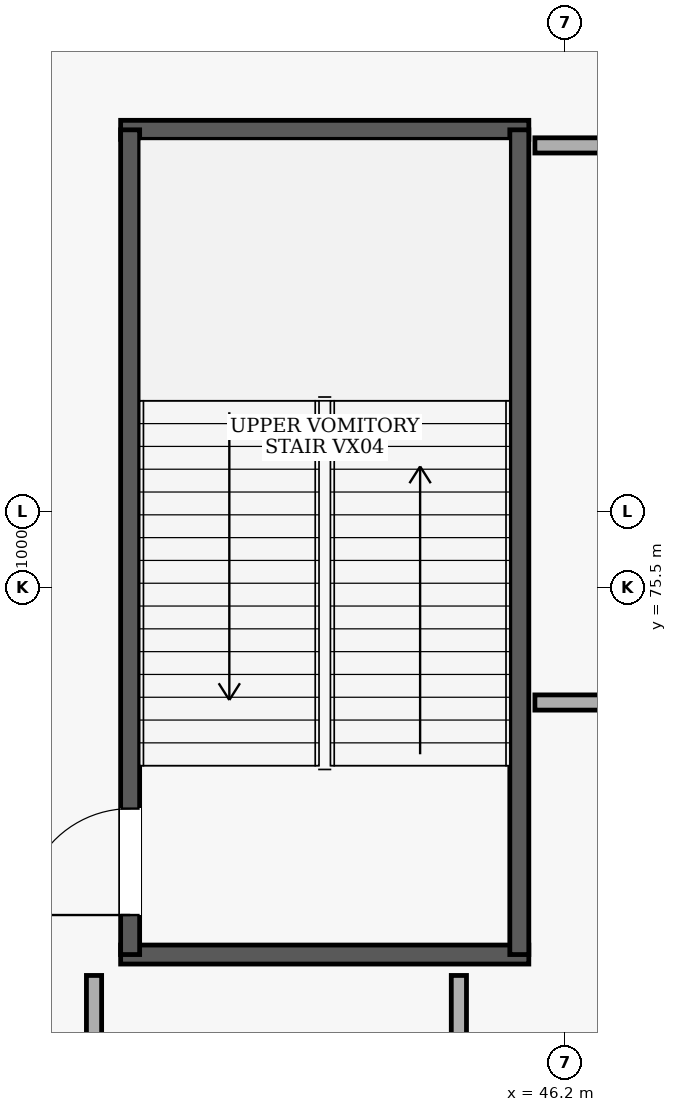
"""IFC4 building model, lengths in metres.
Left out: names, types, materials, properties, quantities, classifications, styles, units other than length and angle.
Written with IfcOpenShell. Run it as: python <this file> out.ifc"""

import sys

from ifc_helpers import new_model, si_unit, direction, frame, frame_2d, origin, place, context, subcontext, project, spatial, rectangle, extrude, element, fill, save


model = new_model("IFC4")
c1 = context("Model", 3, precision=1e-05, world=origin(), true_north=direction((0.0, 1.0)))
c2 = subcontext(c1, "Body", "Model", "MODEL_VIEW")
j1 = project(units=[si_unit("LENGTHUNIT", "METRE"), si_unit("PLANEANGLEUNIT", "RADIAN")], contexts=[c1])
p1 = place(None, origin())
s1 = spatial("IfcSite", under=j1, at=p1, CompositionType="ELEMENT")
p2 = place(p1, origin())
s2 = spatial("IfcBuilding", under=s1, at=p2, CompositionType="ELEMENT")
p3 = place(p2, origin())
s3 = spatial("IfcBuildingStorey", under=s2, at=p3, CompositionType="ELEMENT", Elevation=0.0)
for number, where, z_axis, x_axis in (
    (1, (40.35, 70.675, 0.0), (0.0, 0.0, 1.0), (1.0, 0.0, 0.0)),
    (2, (45.72, 81.525, 0.0), (0.0, 0.0, 1.0), (-1.0, 0.0, 0.0)),
):
    element("IfcWall", number, at=place(p3, frame(where, z_axis=z_axis, x_axis=x_axis)), inside=s3, PredefinedType="SHEAR", context=c2, shape_type="SweptSolid", body=[
        extrude(rectangle(XDim=5.37, YDim=0.25, at=frame_2d((2.685, 0.0))), origin(), (0.0, 0.0, 1.0), 5.08),
    ])
p4 = place(p3, frame((40.475, 70.675, 0.0), z_axis=(0.0, 0.0, 1.0), x_axis=(0.0, 1.0, 0.0)))
e3 = element("IfcWall", 3, at=p4, inside=s3, PredefinedType="SHEAR", context=c2, shape_type="SweptSolid", body=[
    extrude(rectangle(XDim=10.85, YDim=0.25, at=frame_2d((5.425, 0.0))), origin(), (0.0, 0.0, 1.0), 5.08),
])
p5 = place(p4, frame((0.52, 0.0, 0.0)))
e4 = element("IfcOpeningElement", 4, at=p5, cuts=e3, PredefinedType="OPENING", context=c2, shape_type="SweptSolid", body=[
    extrude(rectangle(XDim=1.4, YDim=2.15, at=frame_2d((0.7, 1.075))), frame((0.0, 0.135, 0.0), z_axis=(0.0, -1.0, 0.0), x_axis=(1.0, 0.0, 0.0)), (0.0, 0.0, 1.0), 0.27),
])
p6 = place(p3, frame((45.595, 70.675, 0.0), z_axis=(0.0, 0.0, 1.0), x_axis=(0.0, 1.0, 0.0)))
e5 = element("IfcWall", 5, at=p6, inside=s3, PredefinedType="SHEAR", context=c2, shape_type="SweptSolid", body=[
    extrude(rectangle(XDim=10.85, YDim=0.25, at=frame_2d((5.425, 0.0))), origin(), (0.0, 0.0, 1.0), 5.08),
])
p7 = place(p3, frame((44.8, 67.33, 0.0), z_axis=(0.0, 0.0, 1.0), x_axis=(0.0, 1.0, 0.0)))
e6 = element("IfcWall", 6, at=p7, inside=s3, PredefinedType="PARTITIONING", context=c2, shape_type="SweptSolid", body=[
    extrude(rectangle(XDim=3.07, YDim=0.2, at=frame_2d((1.535, 0.0))), origin(), (0.0, 0.0, 1.0), 5.08),
])
p8 = place(p3, frame((40.0, 70.4, 0.0), z_axis=(0.0, 0.0, 1.0), x_axis=(0.0, -1.0, 0.0)))
e7 = element("IfcWall", 7, at=p8, inside=s3, PredefinedType="PARTITIONING", context=c2, shape_type="SweptSolid", body=[
    extrude(rectangle(XDim=3.07, YDim=0.2, at=frame_2d((1.535, 0.0))), origin(), (0.0, 0.0, 1.0), 5.08),
])
p9 = place(p8, frame((1.035, 0.0, 0.0)))
e8 = element("IfcOpeningElement", 8, at=p9, cuts=e7, PredefinedType="OPENING", context=c2, shape_type="SweptSolid", body=[
    extrude(rectangle(XDim=1.0, YDim=2.1, at=frame_2d((0.5, 1.05))), frame((0.0, 0.11, 0.0), z_axis=(0.0, -1.0, 0.0), x_axis=(1.0, 0.0, 0.0)), (0.0, 0.0, 1.0), 0.22),
])
p10 = place(p3, frame((45.8, 73.991, 0.0), z_axis=(0.0, 0.0, 1.0), x_axis=(1.0, 0.0, 0.0)))
e9 = element("IfcWall", 9, at=p10, inside=s3, PredefinedType="PARTITIONING", context=c2, shape_type="SweptSolid", body=[
    extrude(rectangle(XDim=22.6, YDim=0.2, at=frame_2d((11.3, 0.0))), origin(), (0.0, 0.0, 1.0), 5.08),
])
p11 = place(p3, frame((68.4, 81.32, 0.0), z_axis=(0.0, 0.0, 1.0), x_axis=(-1.0, 0.0, 0.0)))
e10 = element("IfcWall", 10, at=p11, inside=s3, PredefinedType="PARTITIONING", context=c2, shape_type="SweptSolid", body=[
    extrude(rectangle(XDim=22.6, YDim=0.2, at=frame_2d((11.3, 0.0))), origin(), (0.0, 0.0, 1.0), 5.08),
])
p12 = place(p11, frame((10.82, 0.0, 0.0)))
e11 = element("IfcOpeningElement", 11, at=p12, cuts=e10, PredefinedType="OPENING", context=c2, shape_type="SweptSolid", body=[
    extrude(rectangle(XDim=0.96, YDim=2.1, at=frame_2d((0.48, 1.05))), frame((0.0, 0.11, 0.0), z_axis=(0.0, -1.0, 0.0), x_axis=(1.0, 0.0, 0.0)), (0.0, 0.0, 1.0), 0.22),
])
p13 = place(p5, origin())
e12 = element("IfcDoor", 12, at=p13, inside=s3, OperationType="SINGLE_SWING_LEFT", PredefinedType="DOOR", context=c2, shape_type="SweptSolid", body=[
    extrude(rectangle(XDim=1.4, YDim=2.15, at=frame_2d((0.7, 1.075))), frame((0.0, 0.025, 0.0), z_axis=(0.0, -1.0, 0.0), x_axis=(1.0, 0.0, 0.0)), (0.0, 0.0, 1.0), 0.05),
])
fill(e4, e12)
save(model, sys.argv[1])
